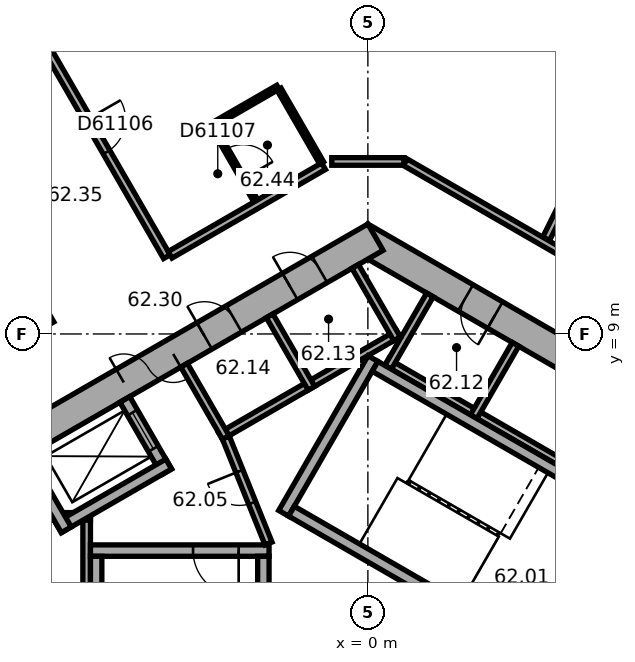
"""IFC4 building model, lengths in metres.
Left out: names, types, materials, properties, quantities, classifications, styles, units other than length and angle.
Written with IfcOpenShell. Run it as: python <this file> out.ifc"""

import sys

from ifc_helpers import new_model, si_unit, direction, frame, frame_2d, origin, place, context, subcontext, project, spatial, rectangle, extrude, element, fill, save


model = new_model("IFC4")
c1 = context("Model", 3, precision=1e-05, world=origin(), true_north=direction((0.0, 1.0)))
c2 = subcontext(c1, "Body", "Model", "MODEL_VIEW")
j1 = project(units=[si_unit("LENGTHUNIT", "METRE"), si_unit("PLANEANGLEUNIT", "RADIAN")], contexts=[c1])
p1 = place(None, origin())
s1 = spatial("IfcSite", under=j1, at=p1, CompositionType="ELEMENT")
p2 = place(p1, origin())
s2 = spatial("IfcBuilding", under=s1, at=p2, CompositionType="ELEMENT")
p3 = place(p2, frame((0.0, 0.0, 251.3)))
s3 = spatial("IfcBuildingStorey", under=s2, at=p3, CompositionType="ELEMENT", Elevation=251.3)
p4 = place(p3, frame((10.1, 5.6, 0.0), z_axis=(0.0, 0.0, 1.0), x_axis=(-0.866023897231, 0.500002609418, 0.0)))
e1 = element("IfcWall", 1, at=p4, inside=s3, PredefinedType="SHEAR", context=c2, shape_type="SweptSolid", body=[
    extrude(rectangle(XDim=11.894, YDim=0.8, at=frame_2d((5.947, 0.0))), origin(), (0.0, 0.0, 1.0), 3.7),
])
p5 = place(p4, frame((3.897, 0.0, 0.0)))
e2 = element("IfcOpeningElement", 2, at=p5, cuts=e1, PredefinedType="OPENING", context=c2, shape_type="SweptSolid", body=[
    extrude(rectangle(XDim=0.9, YDim=2.1, at=frame_2d((0.45, 1.05))), frame((0.0, 0.41, 0.0), z_axis=(0.0, -1.0, 0.0), x_axis=(1.0, 0.0, 0.0)), (0.0, 0.0, 1.0), 0.82),
])
p6 = place(p4, frame((7.797, 0.0, 0.0)))
e3 = element("IfcOpeningElement", 3, at=p6, cuts=e1, PredefinedType="OPENING", context=c2, shape_type="SweptSolid", body=[
    extrude(rectangle(XDim=0.9, YDim=2.1, at=frame_2d((0.45, 1.05))), frame((0.0, 0.41, 0.0), z_axis=(0.0, -1.0, 0.0), x_axis=(1.0, 0.0, 0.0)), (0.0, 0.0, 1.0), 0.82),
])
p7 = place(p3, frame((0.2, 11.547, 0.0), z_axis=(0.0, 0.0, 1.0), x_axis=(-0.866023897231, -0.500002609418, 0.0)))
e4 = element("IfcWall", 4, at=p7, inside=s3, PredefinedType="SHEAR", context=c2, shape_type="SweptSolid", body=[
    extrude(rectangle(XDim=11.894, YDim=0.8, at=frame_2d((5.947, 0.0))), origin(), (0.0, 0.0, 1.0), 3.7),
])
p8 = place(p7, frame((6.147, 0.0, 0.0)))
e5 = element("IfcOpeningElement", 5, at=p8, cuts=e4, PredefinedType="OPENING", context=c2, shape_type="SweptSolid", body=[
    extrude(rectangle(XDim=1.5, YDim=2.1, at=frame_2d((0.75, 1.05))), frame((0.0, 0.41, 0.0), z_axis=(0.0, -1.0, 0.0), x_axis=(1.0, 0.0, 0.0)), (0.0, 0.0, 1.0), 0.82),
])
p9 = place(p7, frame((1.697, 0.0, 0.0)))
e6 = element("IfcOpeningElement", 6, at=p9, cuts=e4, PredefinedType="OPENING", context=c2, shape_type="SweptSolid", body=[
    extrude(rectangle(XDim=0.9, YDim=2.1, at=frame_2d((0.45, 1.05))), frame((0.0, 0.41, 0.0), z_axis=(0.0, -1.0, 0.0), x_axis=(1.0, 0.0, 0.0)), (0.0, 0.0, 1.0), 0.82),
])
p10 = place(p7, frame((4.297, 0.0, 0.0)))
e7 = element("IfcOpeningElement", 7, at=p10, cuts=e4, PredefinedType="OPENING", context=c2, shape_type="SweptSolid", body=[
    extrude(rectangle(XDim=0.9, YDim=2.1, at=frame_2d((0.45, 1.05))), frame((0.0, 0.41, 0.0), z_axis=(0.0, -1.0, 0.0), x_axis=(1.0, 0.0, 0.0)), (0.0, 0.0, 1.0), 0.82),
])
p11 = place(p3, frame((18.299, 13.727, 0.0), z_axis=(0.0, 0.0, 1.0), x_axis=(-0.894934554817, 0.44619742558, 0.0)))
e8 = element("IfcWall", 8, at=p11, inside=s3, PredefinedType="STANDARD", context=c2, shape_type="SweptSolid", body=[
    extrude(rectangle(XDim=18.841, YDim=0.2, at=frame_2d((9.421, 0.0))), origin(), (0.0, 0.0, 1.0), 3.7),
])
p12 = place(p11, frame((1.253, 0.0, 0.9)))
e9 = element("IfcOpeningElement", 9, at=p12, cuts=e8, PredefinedType="OPENING", context=c2, shape_type="SweptSolid", body=[
    extrude(rectangle(XDim=2.2, YDim=2.0, at=frame_2d((1.1, 1.0))), frame((0.0, 0.11, 0.0), z_axis=(0.0, -1.0, 0.0), x_axis=(1.0, 0.0, 0.0)), (0.0, 0.0, 1.0), 0.22),
])
p13 = place(p11, frame((4.786, 0.0, 0.9)))
e10 = element("IfcOpeningElement", 10, at=p13, cuts=e8, PredefinedType="OPENING", context=c2, shape_type="SweptSolid", body=[
    extrude(rectangle(XDim=2.2, YDim=2.0, at=frame_2d((1.1, 1.0))), frame((0.0, 0.11, 0.0), z_axis=(0.0, -1.0, 0.0), x_axis=(1.0, 0.0, 0.0)), (0.0, 0.0, 1.0), 0.22),
])
p14 = place(p11, frame((8.32, 0.0, 0.9)))
e11 = element("IfcOpeningElement", 11, at=p14, cuts=e8, PredefinedType="OPENING", context=c2, shape_type="SweptSolid", body=[
    extrude(rectangle(XDim=2.2, YDim=2.0, at=frame_2d((1.1, 1.0))), frame((0.0, 0.11, 0.0), z_axis=(0.0, -1.0, 0.0), x_axis=(1.0, 0.0, 0.0)), (0.0, 0.0, 1.0), 0.22),
])
p15 = place(p11, frame((11.854, 0.0, 0.9)))
e12 = element("IfcOpeningElement", 12, at=p15, cuts=e8, PredefinedType="OPENING", context=c2, shape_type="SweptSolid", body=[
    extrude(rectangle(XDim=2.2, YDim=2.0, at=frame_2d((1.1, 1.0))), frame((0.0, 0.11, 0.0), z_axis=(0.0, -1.0, 0.0), x_axis=(1.0, 0.0, 0.0)), (0.0, 0.0, 1.0), 0.22),
])
p16 = place(p11, frame((15.387, 0.0, 0.9)))
e13 = element("IfcOpeningElement", 13, at=p16, cuts=e8, PredefinedType="OPENING", context=c2, shape_type="SweptSolid", body=[
    extrude(rectangle(XDim=2.2, YDim=2.0, at=frame_2d((1.1, 1.0))), frame((0.0, 0.11, 0.0), z_axis=(0.0, -1.0, 0.0), x_axis=(1.0, 0.0, 0.0)), (0.0, 0.0, 1.0), 0.22),
])
p17 = place(p3, frame((-2.786, 22.005, 0.0), z_axis=(0.0, 0.0, 1.0), x_axis=(-0.866026555358, -0.49999800541, 0.0)))
e14 = element("IfcWall", 14, at=p17, inside=s3, PredefinedType="STANDARD", context=c2, shape_type="SweptSolid", body=[
    extrude(rectangle(XDim=18.841, YDim=0.2, at=frame_2d((9.421, 0.0))), origin(), (0.0, 0.0, 1.0), 3.7),
])
p18 = place(p17, frame((1.254, 0.0, 0.9)))
e15 = element("IfcOpeningElement", 15, at=p18, cuts=e14, PredefinedType="OPENING", context=c2, shape_type="SweptSolid", body=[
    extrude(rectangle(XDim=2.2, YDim=2.0, at=frame_2d((1.1, 1.0))), frame((0.0, 0.11, 0.0), z_axis=(0.0, -1.0, 0.0), x_axis=(1.0, 0.0, 0.0)), (0.0, 0.0, 1.0), 0.22),
])
p19 = place(p17, frame((4.788, 0.0, 0.9)))
e16 = element("IfcOpeningElement", 16, at=p19, cuts=e14, PredefinedType="OPENING", context=c2, shape_type="SweptSolid", body=[
    extrude(rectangle(XDim=2.2, YDim=2.0, at=frame_2d((1.1, 1.0))), frame((0.0, 0.11, 0.0), z_axis=(0.0, -1.0, 0.0), x_axis=(1.0, 0.0, 0.0)), (0.0, 0.0, 1.0), 0.22),
])
p20 = place(p17, frame((8.321, 0.0, 0.9)))
e17 = element("IfcOpeningElement", 17, at=p20, cuts=e14, PredefinedType="OPENING", context=c2, shape_type="SweptSolid", body=[
    extrude(rectangle(XDim=2.2, YDim=2.0, at=frame_2d((1.1, 1.0))), frame((0.0, 0.11, 0.0), z_axis=(0.0, -1.0, 0.0), x_axis=(1.0, 0.0, 0.0)), (0.0, 0.0, 1.0), 0.22),
])
p21 = place(p17, frame((11.855, 0.0, 0.9)))
e18 = element("IfcOpeningElement", 18, at=p21, cuts=e14, PredefinedType="OPENING", context=c2, shape_type="SweptSolid", body=[
    extrude(rectangle(XDim=2.2, YDim=2.0, at=frame_2d((1.1, 1.0))), frame((0.0, 0.11, 0.0), z_axis=(0.0, -1.0, 0.0), x_axis=(1.0, 0.0, 0.0)), (0.0, 0.0, 1.0), 0.22),
])
p22 = place(p17, frame((15.389, 0.0, 0.9)))
e19 = element("IfcOpeningElement", 19, at=p22, cuts=e14, PredefinedType="OPENING", context=c2, shape_type="SweptSolid", body=[
    extrude(rectangle(XDim=2.2, YDim=2.0, at=frame_2d((1.1, 1.0))), frame((0.0, 0.11, 0.0), z_axis=(0.0, -1.0, 0.0), x_axis=(1.0, 0.0, 0.0)), (0.0, 0.0, 1.0), 0.22),
])
p23 = place(p3, frame((7.424, 4.259, 0.0), z_axis=(0.0, 0.0, 1.0), x_axis=(-0.866026010844, 0.49999894854, 0.0)))
e20 = element("IfcWall", 20, at=p23, inside=s3, PredefinedType="PARTITIONING", context=c2, shape_type="SweptSolid", body=[
    extrude(rectangle(XDim=8.0, YDim=0.2, at=frame_2d((4.0, 0.0))), origin(), (0.0, 0.0, 1.0), 3.35),
])
for number, where, z_axis, x_axis in (
    (21, (2.784, 6.822, 0.0), (0.0, 0.0, 1.0), (0.5, 0.866, 0.0)),
    (22, (0.532, 8.122, 0.0), (0.0, 0.0, 1.0), (0.5, 0.866, 0.0)),
):
    element("IfcWall", number, at=place(p3, frame(where, z_axis=z_axis, x_axis=x_axis)), inside=s3, PredefinedType="PARTITIONING", context=c2, shape_type="SweptSolid", body=[
        extrude(rectangle(XDim=2.2, YDim=0.2, at=frame_2d((1.1, 0.0))), origin(), (0.0, 0.0, 1.0), 3.35),
    ])
p24 = place(p3, frame((0.803, 9.009, 0.0), z_axis=(0.0, 0.0, 1.0), x_axis=(-0.866028230842, -0.499995103361, 0.0)))
e23 = element("IfcWall", 23, at=p24, inside=s3, PredefinedType="PARTITIONING", context=c2, shape_type="SweptSolid", body=[
    extrude(rectangle(XDim=5.4, YDim=0.2, at=frame_2d((2.7, 0.0))), origin(), (0.0, 0.0, 1.0), 3.35),
])
p25 = place(p3, frame((0.767, 8.872, 0.0), z_axis=(0.0, 0.0, 1.0), x_axis=(-0.499994660107, 0.866028486751, 0.0)))
e24 = element("IfcWall", 24, at=p25, inside=s3, PredefinedType="PARTITIONING", context=c2, shape_type="SweptSolid", body=[
    extrude(rectangle(XDim=2.2, YDim=0.2, at=frame_2d((1.1, 0.0))), origin(), (0.0, 0.0, 1.0), 3.35),
])
for number, where, z_axis, x_axis in (
    (25, (-1.485, 7.572, 0.0), (0.0, 0.0, 1.0), (-0.5, 0.866, 0.0)),
    (26, (-3.737, 6.272, 0.0), (0.0, 0.0, 1.0), (-0.5, 0.866, 0.0)),
):
    element("IfcWall", number, at=place(p3, frame(where, z_axis=z_axis, x_axis=x_axis)), inside=s3, PredefinedType="PARTITIONING", context=c2, shape_type="SweptSolid", body=[
        extrude(rectangle(XDim=2.2, YDim=0.2, at=frame_2d((1.1, 0.0))), origin(), (0.0, 0.0, 1.0), 3.35),
    ])
p26 = place(p3, frame((-7.4, 4.3, 0.0), z_axis=(0.0, 0.0, 1.0), x_axis=(0.0, -1.0, 0.0)))
e27 = element("IfcWall", 27, at=p26, inside=s3, PredefinedType="PARTITIONING", context=c2, shape_type="SweptSolid", body=[
    extrude(rectangle(XDim=8.0, YDim=0.2, at=frame_2d((4.0, 0.0))), origin(), (0.0, 0.0, 1.0), 3.35),
])
p27 = place(p3, frame((-7.3, 4.2, 0.0), z_axis=(0.0, 0.0, 1.0), x_axis=(-1.0, 0.0, 0.0)))
e28 = element("IfcWall", 28, at=p27, inside=s3, PredefinedType="PARTITIONING", context=c2, shape_type="SweptSolid", body=[
    extrude(rectangle(XDim=2.2, YDim=0.2, at=frame_2d((1.1, 0.0))), origin(), (0.0, 0.0, 1.0), 3.35),
])
p28 = place(p3, frame((4.158, 0.602, 0.0), z_axis=(0.0, 0.0, 1.0), x_axis=(0.499977259774, 0.866038532462, 0.0)))
e29 = element("IfcWall", 29, at=p28, inside=s3, PredefinedType="SHEAR", context=c2, shape_type="SweptSolid", body=[
    extrude(rectangle(XDim=4.7, YDim=0.3, at=frame_2d((2.35, 0.0))), origin(), (0.0, 0.0, 1.0), 3.35),
])
p29 = place(p28, frame((0.8, 0.0, 0.0)))
e30 = element("IfcOpeningElement", 30, at=p29, cuts=e29, PredefinedType="OPENING", context=c2, shape_type="SweptSolid", body=[
    extrude(rectangle(XDim=1.2, YDim=2.1, at=frame_2d((0.6, 1.05))), frame((0.0, 0.16, 0.0), z_axis=(0.0, -1.0, 0.0), x_axis=(1.0, 0.0, 0.0)), (0.0, 0.0, 1.0), 0.32),
])
p30 = place(p3, frame((-2.216, 4.282, 0.0), z_axis=(0.0, 0.0, 1.0), x_axis=(0.499977259774, 0.866038532462, 0.0)))
e31 = element("IfcWall", 31, at=p30, inside=s3, PredefinedType="SHEAR", context=c2, shape_type="SweptSolid", body=[
    extrude(rectangle(XDim=4.7, YDim=0.3, at=frame_2d((2.35, 0.0))), origin(), (0.0, 0.0, 1.0), 3.35),
])
for number, where, z_axis, x_axis in (
    (32, (4.103, 0.807, 0.0), (0.0, 0.0, 1.0), (-0.866, 0.5, 0.0)),
    (33, (6.303, 4.617, 0.0), (0.0, 0.0, 1.0), (-0.866, 0.5, 0.0)),
):
    element("IfcWall", number, at=place(p3, frame(where, z_axis=z_axis, x_axis=x_axis)), inside=s3, PredefinedType="SHEAR", context=c2, shape_type="SweptSolid", body=[
        extrude(rectangle(XDim=7.06, YDim=0.3, at=frame_2d((3.53, 0.0))), origin(), (0.0, 0.0, 1.0), 3.35),
    ])
p31 = place(p3, frame((-2.6, 3.3, 0.0), z_axis=(0.0, 0.0, 1.0), x_axis=(-1.0, 0.0, 0.0)))
e34 = element("IfcWall", 34, at=p31, inside=s3, PredefinedType="SHEAR", context=c2, shape_type="SweptSolid", body=[
    extrude(rectangle(XDim=4.7, YDim=0.3, at=frame_2d((2.35, 0.0))), origin(), (0.0, 0.0, 1.0), 3.35),
])
p32 = place(p31, frame((0.8, 0.0, 0.0)))
e35 = element("IfcOpeningElement", 35, at=p32, cuts=e34, PredefinedType="OPENING", context=c2, shape_type="SweptSolid", body=[
    extrude(rectangle(XDim=1.2, YDim=2.1, at=frame_2d((0.6, 1.05))), frame((0.0, 0.16, 0.0), z_axis=(0.0, -1.0, 0.0), x_axis=(1.0, 0.0, 0.0)), (0.0, 0.0, 1.0), 0.32),
])
for number, where, z_axis, x_axis in (
    (36, (-2.75, 3.15, 0.0), (0.0, 0.0, 1.0), (0.0, -1.0, 0.0)),
    (37, (-7.15, 3.15, 0.0), (0.0, 0.0, 1.0), (0.0, -1.0, 0.0)),
):
    element("IfcWall", number, at=place(p3, frame(where, z_axis=z_axis, x_axis=x_axis)), inside=s3, PredefinedType="SHEAR", context=c2, shape_type="SweptSolid", body=[
        extrude(rectangle(XDim=7.06, YDim=0.3, at=frame_2d((3.53, 0.0))), origin(), (0.0, 0.0, 1.0), 3.35),
    ])
p33 = place(p3, frame((-5.295, 5.372, 0.0), z_axis=(0.0, 0.0, 1.0), x_axis=(-0.500077893725, 0.86598042715, 0.0)))
e38 = element("IfcWall", 38, at=p33, inside=s3, PredefinedType="SHEAR", context=c2, shape_type="SweptSolid", body=[
    extrude(rectangle(XDim=2.2, YDim=0.3, at=frame_2d((1.1, 0.0))), origin(), (0.0, 0.0, 1.0), 3.35),
])
p34 = place(p33, frame((0.7, 0.0, 0.0)))
e39 = element("IfcOpeningElement", 39, at=p34, cuts=e38, PredefinedType="OPENING", context=c2, shape_type="SweptSolid", body=[
    extrude(rectangle(XDim=1.1, YDim=2.1, at=frame_2d((0.55, 1.05))), frame((0.0, 0.16, 0.0), z_axis=(0.0, -1.0, 0.0), x_axis=(1.0, 0.0, 0.0)), (0.0, 0.0, 1.0), 0.32),
])
p35 = place(p3, frame((-5.24, 5.577, 0.0), z_axis=(0.0, 0.0, 1.0), x_axis=(-0.866014461049, -0.500018952895, 0.0)))
e40 = element("IfcWall", 40, at=p35, inside=s3, PredefinedType="SHEAR", context=c2, shape_type="SweptSolid", body=[
    extrude(rectangle(XDim=3.35, YDim=0.3, at=frame_2d((1.675, 0.0))), origin(), (0.0, 0.0, 1.0), 3.35),
])
p36 = place(p3, frame((-7.937, 3.847, 0.0), z_axis=(0.0, 0.0, 1.0), x_axis=(-0.50002983664, 0.866008176907, 0.0)))
e41 = element("IfcWall", 41, at=p36, inside=s3, PredefinedType="SHEAR", context=c2, shape_type="SweptSolid", body=[
    extrude(rectangle(XDim=2.2, YDim=0.3, at=frame_2d((1.1, 0.0))), origin(), (0.0, 0.0, 1.0), 3.35),
])
p37 = place(p3, frame((-2.615, 3.487, 0.0), z_axis=(0.0, 0.0, 1.0), x_axis=(-0.373576831041, 0.92759924068, 0.0)))
e42 = element("IfcWall", 42, at=p37, inside=s3, PredefinedType="PARTITIONING", context=c2, shape_type="SweptSolid", body=[
    extrude(rectangle(XDim=3.002, YDim=0.2, at=frame_2d((1.501, 0.0))), origin(), (0.0, 0.0, 1.0), 3.35),
])
p38 = place(p37, frame((1.15, 0.0, 0.0)))
e43 = element("IfcOpeningElement", 43, at=p38, cuts=e42, PredefinedType="OPENING", context=c2, shape_type="SweptSolid", body=[
    extrude(rectangle(XDim=0.9, YDim=2.1, at=frame_2d((0.45, 1.05))), frame((0.0, 0.11, 0.0), z_axis=(0.0, -1.0, 0.0), x_axis=(1.0, 0.0, 0.0)), (0.0, 0.0, 1.0), 0.22),
])
p39 = place(p3, frame((-12.025, 15.632, 0.0), z_axis=(0.0, 0.0, 1.0), x_axis=(0.499983153418, -0.866035129944, 0.0)))
e44 = element("IfcWall", 44, at=p39, inside=s3, PredefinedType="PARTITIONING", context=c2, shape_type="SweptSolid", body=[
    extrude(rectangle(XDim=7.35, YDim=0.2, at=frame_2d((3.675, 0.0))), origin(), (0.0, 0.0, 1.0), 3.35),
])
p40 = place(p39, frame((3.175, 0.0, 0.0)))
e45 = element("IfcOpeningElement", 45, at=p40, cuts=e44, PredefinedType="OPENING", context=c2, shape_type="SweptSolid", body=[
    extrude(rectangle(XDim=1.0, YDim=2.1, at=frame_2d((0.5, 1.05))), frame((0.0, 0.11, 0.0), z_axis=(0.0, -1.0, 0.0), x_axis=(1.0, 0.0, 0.0)), (0.0, 0.0, 1.0), 0.22),
])
p41 = place(p3, frame((-8.965, 17.399, 0.0), z_axis=(0.0, 0.0, 1.0), x_axis=(0.499993683172, -0.866029050776, 0.0)))
e46 = element("IfcWall", 46, at=p41, inside=s3, PredefinedType="PARTITIONING", context=c2, shape_type="SweptSolid", body=[
    extrude(rectangle(XDim=7.35, YDim=0.2, at=frame_2d((3.675, 0.0))), origin(), (0.0, 0.0, 1.0), 2.65),
])
p42 = place(p41, frame((3.175, 0.0, 0.0)))
e47 = element("IfcOpeningElement", 47, at=p42, cuts=e46, PredefinedType="OPENING", context=c2, shape_type="SweptSolid", body=[
    extrude(rectangle(XDim=1.0, YDim=2.1, at=frame_2d((0.5, 1.05))), frame((0.0, 0.11, 0.0), z_axis=(0.0, -1.0, 0.0), x_axis=(1.0, 0.0, 0.0)), (0.0, 0.0, 1.0), 0.22),
])
p43 = place(p3, frame((-4.099, 14.492, 0.0), z_axis=(0.0, 0.0, 1.0), x_axis=(0.866041268327, 0.499972520799, 0.0)))
e48 = element("IfcWall", 48, at=p43, inside=s3, PredefinedType="PARTITIONING", context=c2, shape_type="SweptSolid", body=[
    extrude(rectangle(XDim=2.0, YDim=0.12, at=frame_2d((1.0, 0.0))), origin(), (0.0, 0.0, 1.0), 3.35),
])
p44 = place(p3, frame((-2.948, 12.5, 0.0), z_axis=(0.0, 0.0, 1.0), x_axis=(-0.500077830873, 0.865980463445, 0.0)))
e49 = element("IfcWall", 49, at=p44, inside=s3, PredefinedType="PARTITIONING", context=c2, shape_type="SweptSolid", body=[
    extrude(rectangle(XDim=2.24, YDim=0.12, at=frame_2d((1.12, 0.0))), origin(), (0.0, 0.0, 1.0), 3.35),
])
p45 = place(p44, frame((0.67, 0.0, 0.0)))
e50 = element("IfcOpeningElement", 50, at=p45, cuts=e49, PredefinedType="OPENING", context=c2, shape_type="SweptSolid", body=[
    extrude(rectangle(XDim=0.9, YDim=2.1, at=frame_2d((0.45, 1.05))), frame((0.0, 0.07, 0.0), z_axis=(0.0, -1.0, 0.0), x_axis=(1.0, 0.0, 0.0)), (0.0, 0.0, 1.0), 0.14),
])
p46 = place(p3, frame((-2.336, 15.44, 0.0), z_axis=(0.0, 0.0, 1.0), x_axis=(0.49999608499, -0.866027664105, 0.0)))
e51 = element("IfcWall", 51, at=p46, inside=s3, PredefinedType="PARTITIONING", context=c2, shape_type="SweptSolid", body=[
    extrude(rectangle(XDim=2.24, YDim=0.12, at=frame_2d((1.12, 0.0))), origin(), (0.0, 0.0, 1.0), 3.35),
])
p47 = place(p3, frame((-1.167, 13.414, 0.0), z_axis=(0.0, 0.0, 1.0), x_axis=(-0.866023347809, -0.500003561037, 0.0)))
e52 = element("IfcWall", 52, at=p47, inside=s3, PredefinedType="PARTITIONING", context=c2, shape_type="SweptSolid", body=[
    extrude(rectangle(XDim=4.661, YDim=0.2, at=frame_2d((2.331, 0.0))), origin(), (0.0, 0.0, 1.0), 3.35),
])
p48 = place(p3, frame((0.95, 13.539, 0.0), z_axis=(0.0, 0.0, 1.0), x_axis=(-1.0, 0.0, 0.0)))
e53 = element("IfcWall", 53, at=p48, inside=s3, PredefinedType="PARTITIONING", context=c2, shape_type="SweptSolid", body=[
    extrude(rectangle(XDim=1.9, YDim=0.2, at=frame_2d((0.95, 0.0))), origin(), (0.0, 0.0, 1.0), 3.35),
])
p49 = place(p3, frame((7.886, 17.913, 0.0), z_axis=(0.0, 0.0, 1.0), x_axis=(-0.446204015428, -0.894931269213, 0.0)))
e54 = element("IfcWall", 54, at=p49, inside=s3, PredefinedType="PARTITIONING", context=c2, shape_type="SweptSolid", body=[
    extrude(rectangle(XDim=7.16, YDim=0.2, at=frame_2d((3.58, 0.0))), origin(), (0.0, 0.0, 1.0), 3.35),
])
p50 = place(p3, frame((11.25, 7.592, 0.0), z_axis=(0.0, 0.0, 1.0), x_axis=(-0.866024037175, 0.500002367029, 0.0)))
e55 = element("IfcWall", 55, at=p50, inside=s3, PredefinedType="PARTITIONING", context=c2, shape_type="SweptSolid", body=[
    extrude(rectangle(XDim=11.854, YDim=0.2, at=frame_2d((5.927, 0.0))), origin(), (0.0, 0.0, 1.0), 3.35),
])
p51 = place(p50, frame((3.59, 0.0, 0.0)))
e56 = element("IfcOpeningElement", 56, at=p51, cuts=e55, PredefinedType="OPENING", context=c2, shape_type="SweptSolid", body=[
    extrude(rectangle(XDim=1.0, YDim=2.1, at=frame_2d((0.5, 1.05))), frame((0.0, 0.11, 0.0), z_axis=(0.0, -1.0, 0.0), x_axis=(1.0, 0.0, 0.0)), (0.0, 0.0, 1.0), 0.22),
])
p52 = place(p8, origin())
e57 = element("IfcDoor", 57, at=p52, inside=s3, OperationType="DOUBLE_DOOR_SINGLE_SWING", PredefinedType="DOOR", context=c2, shape_type="SweptSolid", body=[
    extrude(rectangle(XDim=1.5, YDim=2.1, at=frame_2d((0.75, 1.05))), frame((0.0, 0.025, 0.0), z_axis=(0.0, -1.0, 0.0), x_axis=(1.0, 0.0, 0.0)), (0.0, 0.0, 1.0), 0.05),
])
fill(e5, e57)
p53 = place(p32, origin())
e58 = element("IfcDoor", 58, at=p53, inside=s3, OperationType="SINGLE_SWING_RIGHT", PredefinedType="DOOR", context=c2, shape_type="SweptSolid", body=[
    extrude(rectangle(XDim=1.2, YDim=2.1, at=frame_2d((0.6, 1.05))), frame((0.0, 0.025, 0.0), z_axis=(0.0, -1.0, 0.0), x_axis=(1.0, 0.0, 0.0)), (0.0, 0.0, 1.0), 0.05),
])
fill(e35, e58)
p54 = place(p38, origin())
e59 = element("IfcDoor", 59, at=p54, inside=s3, OperationType="SINGLE_SWING_LEFT", PredefinedType="DOOR", context=c2, shape_type="SweptSolid", body=[
    extrude(rectangle(XDim=0.9, YDim=2.1, at=frame_2d((0.45, 1.05))), frame((0.0, 0.025, 0.0), z_axis=(0.0, -1.0, 0.0), x_axis=(1.0, 0.0, 0.0)), (0.0, 0.0, 1.0), 0.05),
])
fill(e43, e59)
p55 = place(p6, origin())
e60 = element("IfcDoor", 60, at=p55, inside=s3, OperationType="SINGLE_SWING_LEFT", PredefinedType="DOOR", context=c2, shape_type="SweptSolid", body=[
    extrude(rectangle(XDim=0.9, YDim=2.1, at=frame_2d((0.45, 1.05))), frame((0.0, 0.025, 0.0), z_axis=(0.0, -1.0, 0.0), x_axis=(1.0, 0.0, 0.0)), (0.0, 0.0, 1.0), 0.05),
])
fill(e3, e60)
p56 = place(p9, origin())
e61 = element("IfcDoor", 61, at=p56, inside=s3, OperationType="SINGLE_SWING_LEFT", PredefinedType="DOOR", context=c2, shape_type="SweptSolid", body=[
    extrude(rectangle(XDim=0.9, YDim=2.1, at=frame_2d((0.45, 1.05))), frame((0.0, 0.025, 0.0), z_axis=(0.0, -1.0, 0.0), x_axis=(1.0, 0.0, 0.0)), (0.0, 0.0, 1.0), 0.05),
])
fill(e6, e61)
p57 = place(p10, origin())
e62 = element("IfcDoor", 62, at=p57, inside=s3, OperationType="SINGLE_SWING_LEFT", PredefinedType="DOOR", context=c2, shape_type="SweptSolid", body=[
    extrude(rectangle(XDim=0.9, YDim=2.1, at=frame_2d((0.45, 1.05))), frame((0.0, 0.025, 0.0), z_axis=(0.0, -1.0, 0.0), x_axis=(1.0, 0.0, 0.0)), (0.0, 0.0, 1.0), 0.05),
])
fill(e7, e62)
p58 = place(p34, origin())
e63 = element("IfcDoor", 63, at=p58, inside=s3, OperationType="DOUBLE_DOOR_SLIDING", PredefinedType="DOOR", context=c2, shape_type="SweptSolid", body=[
    extrude(rectangle(XDim=1.1, YDim=2.1, at=frame_2d((0.55, 1.05))), frame((0.0, 0.025, 0.0), z_axis=(0.0, -1.0, 0.0), x_axis=(1.0, 0.0, 0.0)), (0.0, 0.0, 1.0), 0.05),
])
fill(e39, e63)
p59 = place(p42, origin())
e64 = element("IfcDoor", 64, at=p59, inside=s3, OperationType="SINGLE_SWING_LEFT", PredefinedType="DOOR", context=c2, shape_type="SweptSolid", body=[
    extrude(rectangle(XDim=1.0, YDim=2.1, at=frame_2d((0.5, 1.05))), frame((0.0, 0.025, 0.0), z_axis=(0.0, -1.0, 0.0), x_axis=(1.0, 0.0, 0.0)), (0.0, 0.0, 1.0), 0.05),
])
fill(e47, e64)
p60 = place(p45, origin())
e65 = element("IfcDoor", 65, at=p60, inside=s3, OperationType="SINGLE_SWING_LEFT", PredefinedType="DOOR", context=c2, shape_type="SweptSolid", body=[
    extrude(rectangle(XDim=0.9, YDim=2.1, at=frame_2d((0.45, 1.05))), frame((0.0, 0.025, 0.0), z_axis=(0.0, -1.0, 0.0), x_axis=(1.0, 0.0, 0.0)), (0.0, 0.0, 1.0), 0.05),
])
fill(e50, e65)
save(model, sys.argv[1])
